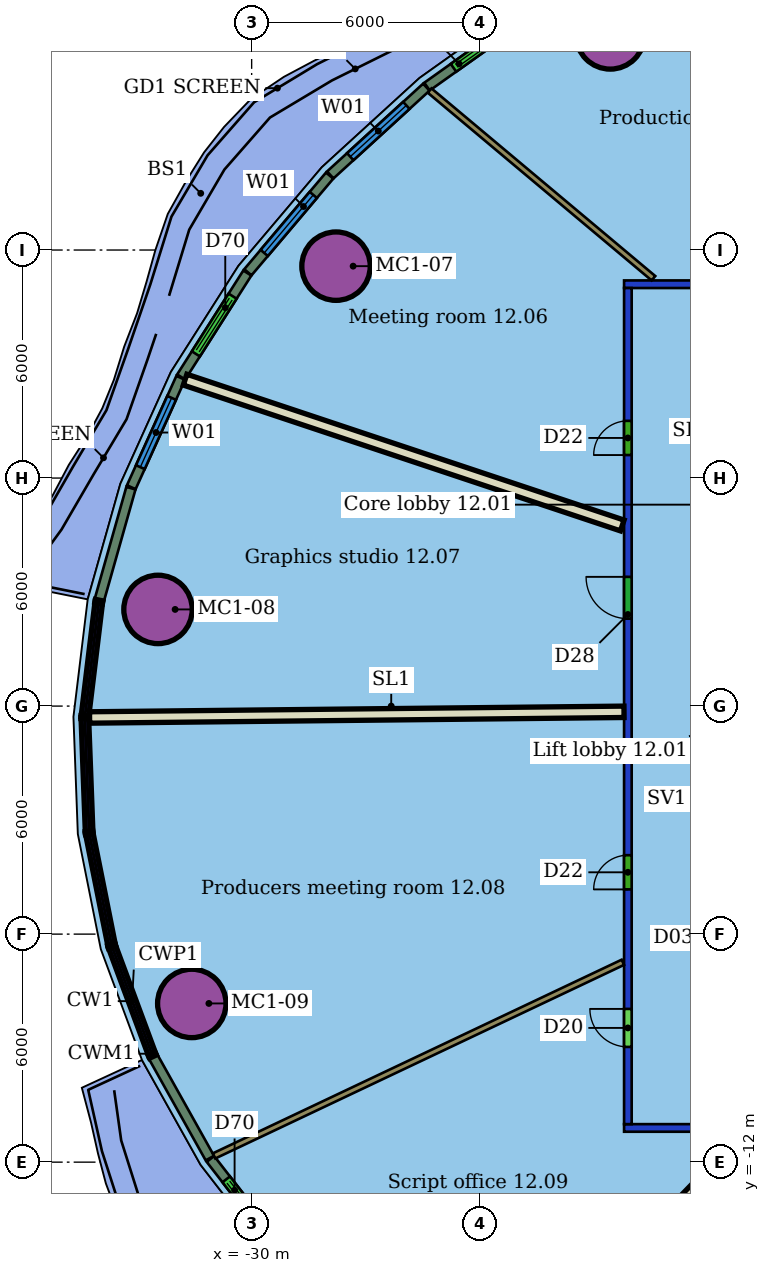
"""IFC4 building model, lengths in metres.
Left out: names, types, materials, properties, quantities, classifications, styles, units other than length and angle.
Written with IfcOpenShell. Run it as: python <this file> out.ifc"""

import sys

from ifc_helpers import new_model, si_unit, direction, frame, frame_2d, origin, origin_2d, place, context, subcontext, project, spatial, rectangle, hollow_circle, extrude, element, fill, save


model = new_model("IFC4")
c1 = context("Model", 3, precision=1e-05, world=origin(), true_north=direction((0.0, 1.0)))
c2 = subcontext(c1, "Body", "Model", "MODEL_VIEW")
j1 = project(units=[si_unit("LENGTHUNIT", "METRE"), si_unit("PLANEANGLEUNIT", "RADIAN")], contexts=[c1])
p1 = place(None, origin())
s1 = spatial("IfcSite", under=j1, at=p1, CompositionType="ELEMENT")
p2 = place(p1, origin())
s2 = spatial("IfcBuilding", under=s1, at=p2, CompositionType="ELEMENT")
p3 = place(p2, frame((0.0, 0.0, 61.9)))
s3 = spatial("IfcBuildingStorey", under=s2, at=p3, CompositionType="ELEMENT", Elevation=61.9)
for number, where, z_axis, x_axis in (
    (1, (-20.563, 17.66, 0.0), (0.0, 0.0, 1.0), (1.0, 0.0, 0.0)),
    (2, (-27.78, 11.576, 0.0), (0.0, 0.0, 1.0), (1.0, 0.0, 0.0)),
    (3, (-32.464, 2.543, 0.0), (0.0, 0.0, 1.0), (1.0, 0.0, 0.0)),
    (4, (-31.575, -7.824, 0.0), (0.0, 0.0, 1.0), (1.0, 0.0, 0.0)),
):
    element("IfcColumn", number, at=place(p3, frame(where, z_axis=z_axis, x_axis=x_axis)), inside=s3, PredefinedType="COLUMN", context=c2, shape_type="SweptSolid", body=[
        extrude(hollow_circle(Radius=0.9, WallThickness=0.06, at=origin_2d()), origin(), (0.0, 0.0, 1.0), 3.55),
    ])
p4 = place(p3, frame((8.2, -11.1, 0.0), z_axis=(0.0, 0.0, 1.0), x_axis=(-1.0, 0.0, 0.0)))
e5 = element("IfcWall", 5, at=p4, inside=s3, PredefinedType="PARTITIONING", context=c2, shape_type="SweptSolid", body=[
    extrude(rectangle(XDim=28.4, YDim=0.2, at=frame_2d((14.2, 0.0))), origin(), (0.0, 0.0, 1.0), 2.85),
])
p5 = place(p4, frame((20.22, 0.0, 0.0)))
e6 = element("IfcOpeningElement", 6, at=p5, cuts=e5, PredefinedType="OPENING", context=c2, shape_type="SweptSolid", body=[
    extrude(rectangle(XDim=1.1, YDim=2.1, at=frame_2d((0.55, 1.05))), frame((0.0, 0.11, 0.0), z_axis=(0.0, -1.0, 0.0), x_axis=(1.0, 0.0, 0.0)), (0.0, 0.0, 1.0), 0.22),
])
p6 = place(p4, frame((15.445, 0.0, 0.0)))
e7 = element("IfcOpeningElement", 7, at=p6, cuts=e5, PredefinedType="OPENING", context=c2, shape_type="SweptSolid", body=[
    extrude(rectangle(XDim=1.5, YDim=2.1, at=frame_2d((0.75, 1.05))), frame((0.0, 0.11, 0.0), z_axis=(0.0, -1.0, 0.0), x_axis=(1.0, 0.0, 0.0)), (0.0, 0.0, 1.0), 0.22),
])
p7 = place(p4, frame((7.586, 0.0, 0.0)))
e8 = element("IfcOpeningElement", 8, at=p7, cuts=e5, PredefinedType="OPENING", context=c2, shape_type="SweptSolid", body=[
    extrude(rectangle(XDim=1.8, YDim=2.1, at=frame_2d((0.9, 1.05))), frame((0.0, 0.11, 0.0), z_axis=(0.0, -1.0, 0.0), x_axis=(1.0, 0.0, 0.0)), (0.0, 0.0, 1.0), 0.22),
])
p8 = place(p3, frame((-20.1, -11.0, 0.0), z_axis=(0.0, 0.0, 1.0), x_axis=(0.0, 1.0, 0.0)))
e9 = element("IfcWall", 9, at=p8, inside=s3, PredefinedType="PARTITIONING", context=c2, shape_type="SweptSolid", body=[
    extrude(rectangle(XDim=22.0, YDim=0.2, at=frame_2d((11.0, 0.0))), origin(), (0.0, 0.0, 1.0), 2.85),
])
p9 = place(p8, frame((17.605, 0.0, 0.0)))
e10 = element("IfcOpeningElement", 10, at=p9, cuts=e9, PredefinedType="OPENING", context=c2, shape_type="SweptSolid", body=[
    extrude(rectangle(XDim=0.9, YDim=2.1, at=frame_2d((0.45, 1.05))), frame((0.0, 0.11, 0.0), z_axis=(0.0, -1.0, 0.0), x_axis=(1.0, 0.0, 0.0)), (0.0, 0.0, 1.0), 0.22),
])
p10 = place(p8, frame((13.3, 0.0, 0.0)))
e11 = element("IfcOpeningElement", 11, at=p10, cuts=e9, PredefinedType="OPENING", context=c2, shape_type="SweptSolid", body=[
    extrude(rectangle(XDim=1.1, YDim=2.1, at=frame_2d((0.55, 1.05))), frame((0.0, 0.11, 0.0), z_axis=(0.0, -1.0, 0.0), x_axis=(1.0, 0.0, 0.0)), (0.0, 0.0, 1.0), 0.22),
])
p11 = place(p8, frame((6.177, 0.0, 0.0)))
e12 = element("IfcOpeningElement", 12, at=p11, cuts=e9, PredefinedType="OPENING", context=c2, shape_type="SweptSolid", body=[
    extrude(rectangle(XDim=0.9, YDim=2.1, at=frame_2d((0.45, 1.05))), frame((0.0, 0.11, 0.0), z_axis=(0.0, -1.0, 0.0), x_axis=(1.0, 0.0, 0.0)), (0.0, 0.0, 1.0), 0.22),
])
p12 = place(p8, frame((2.032, 0.0, 0.0)))
e13 = element("IfcOpeningElement", 13, at=p12, cuts=e9, PredefinedType="OPENING", context=c2, shape_type="SweptSolid", body=[
    extrude(rectangle(XDim=1.0, YDim=2.1, at=frame_2d((0.5, 1.05))), frame((0.0, 0.11, 0.0), z_axis=(0.0, -1.0, 0.0), x_axis=(1.0, 0.0, 0.0)), (0.0, 0.0, 1.0), 0.22),
])
p13 = place(p3, frame((-20.2, 11.1, 0.0), z_axis=(0.0, 0.0, 1.0), x_axis=(1.0, 0.0, 0.0)))
e14 = element("IfcWall", 14, at=p13, inside=s3, PredefinedType="PARTITIONING", context=c2, shape_type="SweptSolid", body=[
    extrude(rectangle(XDim=28.4, YDim=0.2, at=frame_2d((14.2, 0.0))), origin(), (0.0, 0.0, 1.0), 2.85),
])
p14 = place(p13, frame((24.029, 0.0, 0.0)))
e15 = element("IfcOpeningElement", 15, at=p14, cuts=e14, PredefinedType="OPENING", context=c2, shape_type="SweptSolid", body=[
    extrude(rectangle(XDim=1.5, YDim=2.1, at=frame_2d((0.75, 1.05))), frame((0.0, 0.11, 0.0), z_axis=(0.0, -1.0, 0.0), x_axis=(1.0, 0.0, 0.0)), (0.0, 0.0, 1.0), 0.22),
])
p15 = place(p13, frame((18.723, 0.0, 0.0)))
e16 = element("IfcOpeningElement", 16, at=p15, cuts=e14, PredefinedType="OPENING", context=c2, shape_type="SweptSolid", body=[
    extrude(rectangle(XDim=1.0, YDim=2.1, at=frame_2d((0.5, 1.05))), frame((0.0, 0.11, 0.0), z_axis=(0.0, -1.0, 0.0), x_axis=(1.0, 0.0, 0.0)), (0.0, 0.0, 1.0), 0.22),
])
p16 = place(p13, frame((10.0, 0.0, 0.0)))
e17 = element("IfcOpeningElement", 17, at=p16, cuts=e14, PredefinedType="OPENING", context=c2, shape_type="SweptSolid", body=[
    extrude(rectangle(XDim=1.2, YDim=2.1, at=frame_2d((0.6, 1.05))), frame((0.0, 0.11, 0.0), z_axis=(0.0, -1.0, 0.0), x_axis=(1.0, 0.0, 0.0)), (0.0, 0.0, 1.0), 0.22),
])
p17 = place(p13, frame((5.648, 0.0, 0.0)))
e18 = element("IfcOpeningElement", 18, at=p17, cuts=e14, PredefinedType="OPENING", context=c2, shape_type="SweptSolid", body=[
    extrude(rectangle(XDim=1.0, YDim=2.1, at=frame_2d((0.5, 1.05))), frame((0.0, 0.11, 0.0), z_axis=(0.0, -1.0, 0.0), x_axis=(1.0, 0.0, 0.0)), (0.0, 0.0, 1.0), 0.22),
])
p18 = place(p3, frame((-25.317, 16.196, 0.0), z_axis=(0.0, 0.0, 1.0), x_axis=(0.766312100658, -0.642468492913, 0.0)))
e19 = element("IfcWall", 19, at=p18, inside=s3, PredefinedType="PARTITIONING", context=c2, shape_type="SweptSolid", body=[
    extrude(rectangle(XDim=7.686, YDim=0.15, at=frame_2d((3.843, 0.0))), origin(), (0.0, 0.0, 1.0), 3.55),
])
p19 = place(p3, frame((-31.752, 8.589, 0.0), z_axis=(0.0, 0.0, 1.0), x_axis=(0.948622885836, -0.316408944986, 0.0)))
e20 = element("IfcWall", 20, at=p19, inside=s3, PredefinedType="PARTITIONING", context=c2, shape_type="SweptSolid", body=[
    extrude(rectangle(XDim=12.127, YDim=0.3, at=frame_2d((6.063, 0.0))), origin(), (0.0, 0.0, 1.0), 3.55),
])
p20 = place(p3, frame((-34.265, -0.3, 0.0), z_axis=(0.0, 0.0, 1.0), x_axis=(0.999943935511, 0.010588948696, 0.0)))
e21 = element("IfcWall", 21, at=p20, inside=s3, PredefinedType="PARTITIONING", context=c2, shape_type="SweptSolid", body=[
    extrude(rectangle(XDim=14.064, YDim=0.3, at=frame_2d((7.032, 0.0))), origin(), (0.0, 0.0, 1.0), 3.55),
])
p21 = place(p3, frame((-30.989, -11.836, 0.0), z_axis=(0.0, 0.0, 1.0), x_axis=(0.903749950704, 0.428060774427, 0.0)))
e22 = element("IfcWall", 22, at=p21, inside=s3, PredefinedType="PARTITIONING", context=c2, shape_type="SweptSolid", body=[
    extrude(rectangle(XDim=11.902, YDim=0.15, at=frame_2d((5.951, 0.0))), origin(), (0.0, 0.0, 1.0), 3.55),
])
p22 = place(p3, frame((-24.025, -18.58, 0.0), z_axis=(0.0, 0.0, 1.0), x_axis=(0.696307194709, 0.717743889278, 0.0)))
e23 = element("IfcWall", 23, at=p22, inside=s3, PredefinedType="PARTITIONING", context=c2, shape_type="SweptSolid", body=[
    extrude(rectangle(XDim=10.136, YDim=0.3, at=frame_2d((5.068, 0.0))), origin(), (0.0, 0.0, 1.0), 3.55),
])
p23 = place(p3, frame((-22.526, 18.333, 0.0), z_axis=(0.0, 0.0, 1.0), x_axis=(-0.814907125468, -0.579591560378, 0.0)))
e24 = element("IfcWall", 24, at=p23, inside=s3, PredefinedType="SOLIDWALL", context=c2, shape_type="SweptSolid", body=[
    extrude(rectangle(XDim=3.509, YDim=0.25, at=frame_2d((1.754, 0.0))), origin(), (0.0, 0.0, 1.0), 3.15),
])
p24 = place(p23, frame((0.854, 0.0, 0.0)))
e25 = element("IfcOpeningElement", 25, at=p24, cuts=e24, PredefinedType="OPENING", context=c2, shape_type="SweptSolid", body=[
    extrude(rectangle(XDim=1.8, YDim=2.4, at=frame_2d((0.9, 1.2))), frame((0.0, 0.135, 0.0), z_axis=(0.0, -1.0, 0.0), x_axis=(1.0, 0.0, 0.0)), (0.0, 0.0, 1.0), 0.27),
])
p25 = place(p3, frame((-25.404, 16.285, 0.0), z_axis=(0.0, 0.0, 1.0), x_axis=(-0.738233763611, -0.67454496534, 0.0)))
e26 = element("IfcWall", 26, at=p25, inside=s3, PredefinedType="SOLIDWALL", context=c2, shape_type="SweptSolid", body=[
    extrude(rectangle(XDim=3.423, YDim=0.25, at=frame_2d((1.711, 0.0))), origin(), (0.0, 0.0, 1.0), 3.15),
])
p26 = place(p25, frame((0.712, 0.0, 0.8)))
e27 = element("IfcOpeningElement", 27, at=p26, cuts=e26, PredefinedType="OPENING", context=c2, shape_type="SweptSolid", body=[
    extrude(rectangle(XDim=2.0, YDim=2.2, at=frame_2d((1.0, 1.1))), frame((0.0, 0.135, 0.0), z_axis=(0.0, -1.0, 0.0), x_axis=(1.0, 0.0, 0.0)), (0.0, 0.0, 1.0), 0.27),
])
p27 = place(p3, frame((-27.948, 13.959, 0.0), z_axis=(0.0, 0.0, 1.0), x_axis=(-0.645781290873, -0.763522445222, 0.0)))
e28 = element("IfcWall", 28, at=p27, inside=s3, PredefinedType="SOLIDWALL", context=c2, shape_type="SweptSolid", body=[
    extrude(rectangle(XDim=3.332, YDim=0.25, at=frame_2d((1.666, 0.0))), origin(), (0.0, 0.0, 1.0), 3.15),
])
p28 = place(p27, frame((0.666, 0.0, 0.8)))
e29 = element("IfcOpeningElement", 29, at=p28, cuts=e28, PredefinedType="OPENING", context=c2, shape_type="SweptSolid", body=[
    extrude(rectangle(XDim=2.0, YDim=2.2, at=frame_2d((1.0, 1.1))), frame((0.0, 0.135, 0.0), z_axis=(0.0, -1.0, 0.0), x_axis=(1.0, 0.0, 0.0)), (0.0, 0.0, 1.0), 0.27),
])
p29 = place(p3, frame((-30.114, 11.395, 0.0), z_axis=(0.0, 0.0, 1.0), x_axis=(-0.536899857644, -0.843645981951, 0.0)))
e30 = element("IfcWall", 30, at=p29, inside=s3, PredefinedType="SOLIDWALL", context=c2, shape_type="SweptSolid", body=[
    extrude(rectangle(XDim=3.242, YDim=0.25, at=frame_2d((1.621, 0.0))), origin(), (0.0, 0.0, 1.0), 3.15),
])
p30 = place(p29, frame((0.721, 0.0, 0.0)))
e31 = element("IfcOpeningElement", 31, at=p30, cuts=e30, PredefinedType="OPENING", context=c2, shape_type="SweptSolid", body=[
    extrude(rectangle(XDim=1.8, YDim=2.4, at=frame_2d((0.9, 1.2))), frame((0.0, 0.135, 0.0), z_axis=(0.0, -1.0, 0.0), x_axis=(1.0, 0.0, 0.0)), (0.0, 0.0, 1.0), 0.27),
])
p31 = place(p3, frame((-31.867, 8.637, 0.0), z_axis=(0.0, 0.0, 1.0), x_axis=(-0.411804193901, -0.911272355493, 0.0)))
e32 = element("IfcWall", 32, at=p31, inside=s3, PredefinedType="SOLIDWALL", context=c2, shape_type="SweptSolid", body=[
    extrude(rectangle(XDim=3.158, YDim=0.25, at=frame_2d((1.579, 0.0))), origin(), (0.0, 0.0, 1.0), 3.15),
])
p32 = place(p31, frame((0.579, 0.0, 0.8)))
e33 = element("IfcOpeningElement", 33, at=p32, cuts=e32, PredefinedType="OPENING", context=c2, shape_type="SweptSolid", body=[
    extrude(rectangle(XDim=2.0, YDim=2.2, at=frame_2d((1.0, 1.1))), frame((0.0, 0.135, 0.0), z_axis=(0.0, -1.0, 0.0), x_axis=(1.0, 0.0, 0.0)), (0.0, 0.0, 1.0), 0.27),
])
p33 = place(p3, frame((-33.177, 5.734, 0.0), z_axis=(0.0, 0.0, 1.0), x_axis=(-0.27192635973, -0.962318063264, 0.0)))
e34 = element("IfcWall", 34, at=p33, inside=s3, PredefinedType="SOLIDWALL", context=c2, shape_type="SweptSolid", body=[
    extrude(rectangle(XDim=3.047, YDim=0.25, at=frame_2d((1.523, 0.0))), origin(), (0.0, 0.0, 1.0), 3.15),
])
p34 = place(p3, frame((-32.587, -9.234, 0.0), z_axis=(0.0, 0.0, 1.0), x_axis=(0.488205617754, -0.872728637547, 0.0)))
e35 = element("IfcWall", 35, at=p34, inside=s3, PredefinedType="SOLIDWALL", context=c2, shape_type="SweptSolid", body=[
    extrude(rectangle(XDim=3.047, YDim=0.25, at=frame_2d((1.523, 0.0))), origin(), (0.0, 0.0, 1.0), 3.15),
])
p35 = place(p3, frame((-31.085, -11.916, 0.0), z_axis=(0.0, 0.0, 1.0), x_axis=(0.612382091745, -0.790561935404, 0.0)))
e36 = element("IfcWall", 36, at=p35, inside=s3, PredefinedType="SOLIDWALL", context=c2, shape_type="SweptSolid", body=[
    extrude(rectangle(XDim=3.158, YDim=0.25, at=frame_2d((1.579, 0.0))), origin(), (0.0, 0.0, 1.0), 3.15),
])
p36 = place(p35, frame((0.679, 0.0, 0.0)))
e37 = element("IfcOpeningElement", 37, at=p36, cuts=e36, PredefinedType="OPENING", context=c2, shape_type="SweptSolid", body=[
    extrude(rectangle(XDim=1.8, YDim=2.4, at=frame_2d((0.9, 1.2))), frame((0.0, 0.135, 0.0), z_axis=(0.0, -1.0, 0.0), x_axis=(1.0, 0.0, 0.0)), (0.0, 0.0, 1.0), 0.27),
])
p37 = place(p9, origin())
e38 = element("IfcDoor", 38, at=p37, inside=s3, OperationType="SINGLE_SWING_LEFT", PredefinedType="DOOR", context=c2, shape_type="SweptSolid", body=[
    extrude(rectangle(XDim=0.9, YDim=2.1, at=frame_2d((0.45, 1.05))), frame((0.0, 0.025, 0.0), z_axis=(0.0, -1.0, 0.0), x_axis=(1.0, 0.0, 0.0)), (0.0, 0.0, 1.0), 0.05),
])
fill(e10, e38)
p38 = place(p10, origin())
e39 = element("IfcDoor", 39, at=p38, inside=s3, OperationType="SINGLE_SWING_RIGHT", PredefinedType="DOOR", context=c2, shape_type="SweptSolid", body=[
    extrude(rectangle(XDim=1.1, YDim=2.1, at=frame_2d((0.55, 1.05))), frame((0.0, 0.025, 0.0), z_axis=(0.0, -1.0, 0.0), x_axis=(1.0, 0.0, 0.0)), (0.0, 0.0, 1.0), 0.05),
])
fill(e11, e39)
p39 = place(p11, origin())
e40 = element("IfcDoor", 40, at=p39, inside=s3, OperationType="SINGLE_SWING_LEFT", PredefinedType="DOOR", context=c2, shape_type="SweptSolid", body=[
    extrude(rectangle(XDim=0.9, YDim=2.1, at=frame_2d((0.45, 1.05))), frame((0.0, 0.025, 0.0), z_axis=(0.0, -1.0, 0.0), x_axis=(1.0, 0.0, 0.0)), (0.0, 0.0, 1.0), 0.05),
])
fill(e12, e40)
p40 = place(p12, origin())
e41 = element("IfcDoor", 41, at=p40, inside=s3, OperationType="SINGLE_SWING_RIGHT", PredefinedType="DOOR", context=c2, shape_type="SweptSolid", body=[
    extrude(rectangle(XDim=1.0, YDim=2.1, at=frame_2d((0.5, 1.05))), frame((0.0, 0.025, 0.0), z_axis=(0.0, -1.0, 0.0), x_axis=(1.0, 0.0, 0.0)), (0.0, 0.0, 1.0), 0.05),
])
fill(e13, e41)
p41 = place(p24, origin())
e42 = element("IfcDoor", 42, at=p41, inside=s3, OperationType="DOUBLE_DOOR_SLIDING", PredefinedType="DOOR", context=c2, shape_type="SweptSolid", body=[
    extrude(rectangle(XDim=1.8, YDim=2.4, at=frame_2d((0.9, 1.2))), frame((0.0, 0.025, 0.0), z_axis=(0.0, -1.0, 0.0), x_axis=(1.0, 0.0, 0.0)), (0.0, 0.0, 1.0), 0.05),
])
fill(e25, e42)
p42 = place(p26, origin())
e43 = element("IfcWindow", 43, at=p42, inside=s3, PartitioningType="SINGLE_PANEL", PredefinedType="WINDOW", context=c2, shape_type="SweptSolid", body=[
    extrude(rectangle(XDim=2.0, YDim=2.2, at=frame_2d((1.0, 1.1))), frame((0.0, 0.03, 0.0), z_axis=(0.0, -1.0, 0.0), x_axis=(1.0, 0.0, 0.0)), (0.0, 0.0, 1.0), 0.06),
])
fill(e27, e43)
p43 = place(p28, origin())
e44 = element("IfcWindow", 44, at=p43, inside=s3, PartitioningType="SINGLE_PANEL", PredefinedType="WINDOW", context=c2, shape_type="SweptSolid", body=[
    extrude(rectangle(XDim=2.0, YDim=2.2, at=frame_2d((1.0, 1.1))), frame((0.0, 0.03, 0.0), z_axis=(0.0, -1.0, 0.0), x_axis=(1.0, 0.0, 0.0)), (0.0, 0.0, 1.0), 0.06),
])
fill(e29, e44)
p44 = place(p30, origin())
e45 = element("IfcDoor", 45, at=p44, inside=s3, OperationType="DOUBLE_DOOR_SLIDING", PredefinedType="DOOR", context=c2, shape_type="SweptSolid", body=[
    extrude(rectangle(XDim=1.8, YDim=2.4, at=frame_2d((0.9, 1.2))), frame((0.0, 0.025, 0.0), z_axis=(0.0, -1.0, 0.0), x_axis=(1.0, 0.0, 0.0)), (0.0, 0.0, 1.0), 0.05),
])
fill(e31, e45)
p45 = place(p32, origin())
e46 = element("IfcWindow", 46, at=p45, inside=s3, PartitioningType="SINGLE_PANEL", PredefinedType="WINDOW", context=c2, shape_type="SweptSolid", body=[
    extrude(rectangle(XDim=2.0, YDim=2.2, at=frame_2d((1.0, 1.1))), frame((0.0, 0.03, 0.0), z_axis=(0.0, -1.0, 0.0), x_axis=(1.0, 0.0, 0.0)), (0.0, 0.0, 1.0), 0.06),
])
fill(e33, e46)
p46 = place(p36, origin())
e47 = element("IfcDoor", 47, at=p46, inside=s3, OperationType="DOUBLE_DOOR_SLIDING", PredefinedType="DOOR", context=c2, shape_type="SweptSolid", body=[
    extrude(rectangle(XDim=1.8, YDim=2.4, at=frame_2d((0.9, 1.2))), frame((0.0, 0.025, 0.0), z_axis=(0.0, -1.0, 0.0), x_axis=(1.0, 0.0, 0.0)), (0.0, 0.0, 1.0), 0.05),
])
fill(e37, e47)
save(model, sys.argv[1])
